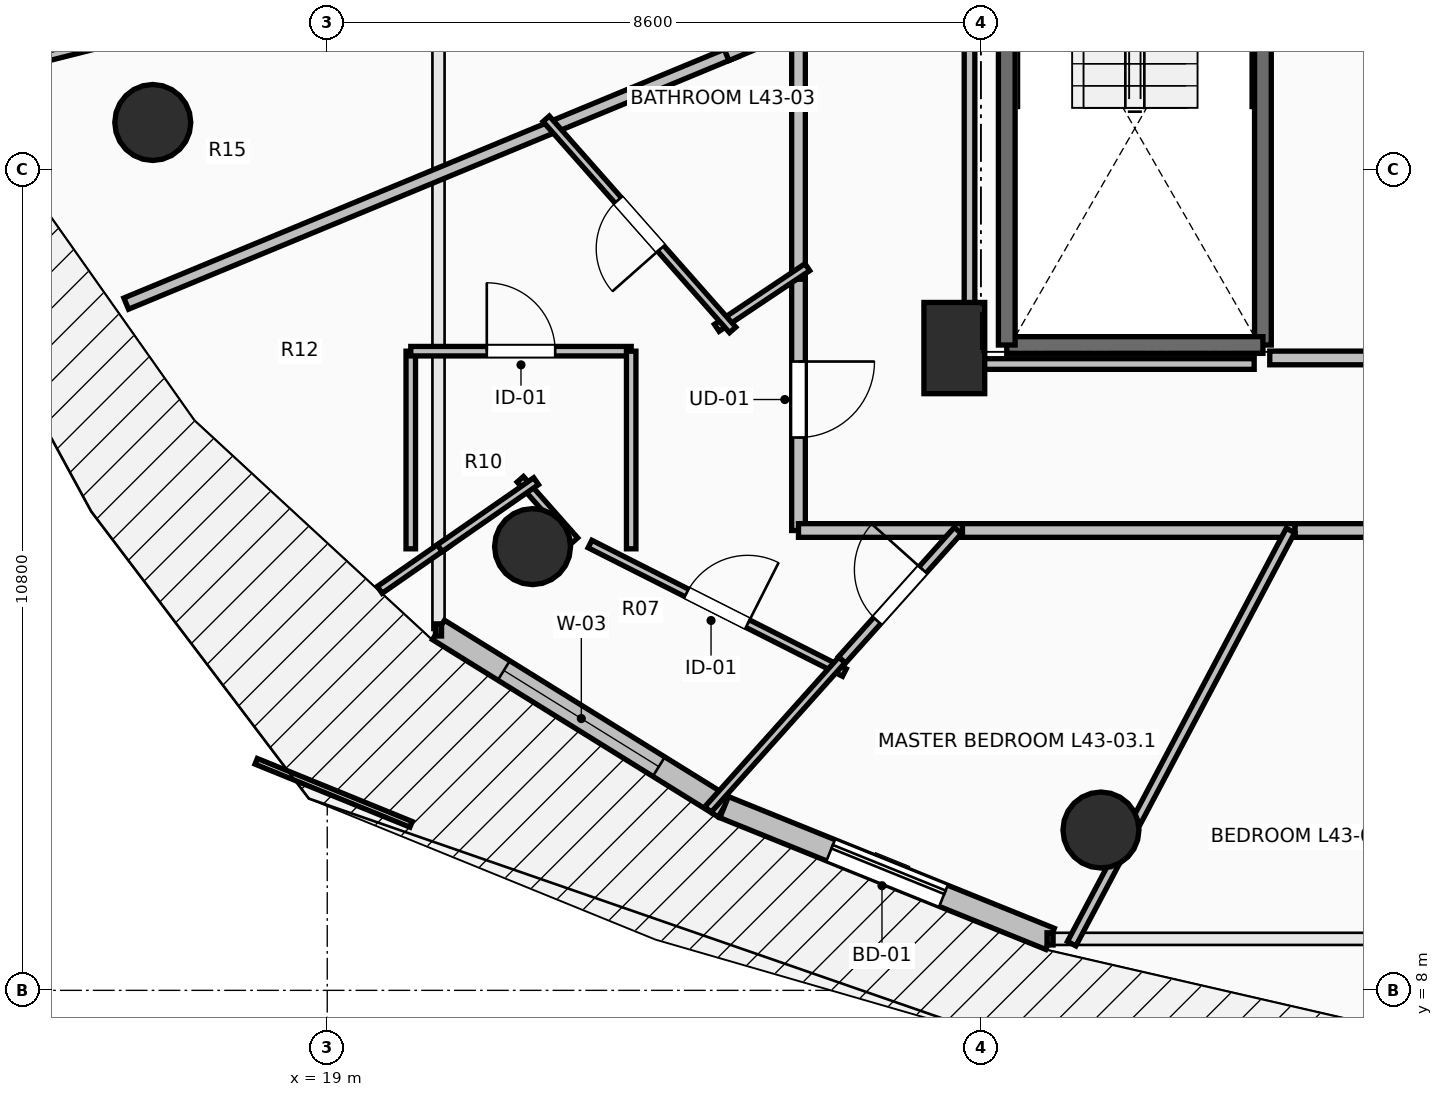
"""IFC4 building model, lengths in metres.
Left out: names, types, materials, properties, quantities, classifications, styles, units other than length and angle.
Written with IfcOpenShell. Run it as: python <this file> out.ifc"""

import sys

from ifc_helpers import new_model, si_unit, direction, frame, frame_2d, origin, origin_2d, place, context, subcontext, project, spatial, rectangle, circle, extrude, element, fill, save


model = new_model("IFC4")
c1 = context("Model", 3, precision=1e-05, world=origin(), true_north=direction((0.0, 1.0)))
c2 = subcontext(c1, "Body", "Model", "MODEL_VIEW")
j1 = project(units=[si_unit("LENGTHUNIT", "METRE"), si_unit("PLANEANGLEUNIT", "RADIAN")], contexts=[c1])
p1 = place(None, origin())
s1 = spatial("IfcSite", under=j1, at=p1, CompositionType="ELEMENT")
p2 = place(p1, origin())
s2 = spatial("IfcBuilding", under=s1, at=p2, CompositionType="ELEMENT")
p3 = place(p2, frame((0.0, 0.0, 160.6)))
s3 = spatial("IfcBuildingStorey", under=s2, at=p3, CompositionType="ELEMENT", Elevation=160.6)
for number, where, z_axis, x_axis in (
    (1, (16.705, 19.418, 0.0), (0.0, 0.0, 1.0), (-0.924, -0.383, 0.0)),
    (2, (21.701, 13.838, 0.0), (0.0, 0.0, 1.0), (-0.707, -0.707, 0.0)),
    (3, (29.179, 10.109, 0.0), (0.0, 0.0, 1.0), (-0.383, -0.924, 0.0)),
):
    element("IfcColumn", number, at=place(p3, frame(where, z_axis=z_axis, x_axis=x_axis)), inside=s3, PredefinedType="COLUMN", context=c2, shape_type="SweptSolid", body=[
        extrude(circle(Radius=0.5, at=origin_2d()), origin(), (0.0, 0.0, 1.0), 3.5),
    ])
p4 = place(p3, frame((27.25, 16.45, 0.0), z_axis=(0.0, 0.0, 1.0), x_axis=(1.0, 0.0, 0.0)))
e4 = element("IfcColumn", 4, at=p4, inside=s3, PredefinedType="PILASTER", context=c2, shape_type="SweptSolid", body=[
    extrude(rectangle(XDim=0.8, YDim=1.2, at=origin_2d()), origin(), (0.0, 0.0, 1.0), 3.5),
])
p5 = place(p3, frame((20.464, 12.742, 0.0), z_axis=(0.0, 0.0, 1.0), x_axis=(0.849721181976, -0.527232313977, 0.0)))
e5 = element("IfcWall", 5, at=p5, inside=s3, PredefinedType="STANDARD", context=c2, shape_type="SweptSolid", body=[
    extrude(rectangle(XDim=4.423, YDim=0.3, at=frame_2d((2.211, 0.0))), origin(), (0.0, 0.0, 1.0), 3.24),
])
p6 = place(p5, frame((1.011, 0.0, 0.85)))
e6 = element("IfcOpeningElement", 6, at=p6, cuts=e5, PredefinedType="OPENING", context=c2, shape_type="SweptSolid", body=[
    extrude(rectangle(XDim=2.4, YDim=2.19, at=frame_2d((1.2, 1.095))), frame((0.0, 0.165, 0.0), z_axis=(0.0, -1.0, 0.0), x_axis=(1.0, 0.0, 0.0)), (0.0, 0.0, 1.0), 0.33),
])
p7 = place(p3, frame((24.222, 10.41, 0.0), z_axis=(0.0, 0.0, 1.0), x_axis=(0.927156504392, -0.374674280359, 0.0)))
e7 = element("IfcWall", 7, at=p7, inside=s3, PredefinedType="STANDARD", context=c2, shape_type="SweptSolid", body=[
    extrude(rectangle(XDim=4.625, YDim=0.3, at=frame_2d((2.312, 0.0))), origin(), (0.0, 0.0, 1.0), 3.24),
])
p8 = place(p7, frame((1.512, 0.0, 0.0)))
e8 = element("IfcOpeningElement", 8, at=p8, cuts=e7, PredefinedType="OPENING", context=c2, shape_type="SweptSolid", body=[
    extrude(rectangle(XDim=1.6, YDim=2.3, at=frame_2d((0.8, 1.15))), frame((0.0, 0.165, 0.0), z_axis=(0.0, -1.0, 0.0), x_axis=(1.0, 0.0, 0.0)), (0.0, 0.0, 1.0), 0.33),
])
p9 = place(p3, frame((31.31, 23.91, 0.0), z_axis=(0.0, 0.0, 1.0), x_axis=(0.0, -1.0, 0.0)))
e9 = element("IfcWall", 9, at=p9, inside=s3, PredefinedType="SOLIDWALL", context=c2, shape_type="SweptSolid", body=[
    extrude(rectangle(XDim=7.42, YDim=0.22, at=frame_2d((3.71, 0.0))), origin(), (0.0, 0.0, 1.0), 3.24),
])
p10 = place(p3, frame((31.31, 16.49, 0.0), z_axis=(0.0, 0.0, 1.0), x_axis=(-1.0, 0.0, 0.0)))
e10 = element("IfcWall", 10, at=p10, inside=s3, PredefinedType="SOLIDWALL", context=c2, shape_type="SweptSolid", body=[
    extrude(rectangle(XDim=3.37, YDim=0.22, at=frame_2d((1.685, 0.0))), origin(), (0.0, 0.0, 1.0), 3.24),
])
p11 = place(p3, frame((27.94, 16.49, 0.0), z_axis=(0.0, 0.0, 1.0), x_axis=(0.0, 1.0, 0.0)))
e11 = element("IfcWall", 11, at=p11, inside=s3, PredefinedType="SOLIDWALL", context=c2, shape_type="SweptSolid", body=[
    extrude(rectangle(XDim=7.42, YDim=0.22, at=frame_2d((3.71, 0.0))), origin(), (0.0, 0.0, 1.0), 3.24),
])
p12 = place(p3, frame((31.4, 16.32, 0.0), z_axis=(0.0, 0.0, 1.0), x_axis=(1.0, 0.0, 0.0)))
e12 = element("IfcWall", 12, at=p12, inside=s3, PredefinedType="PARTITIONING", context=c2, shape_type="SweptSolid", body=[
    extrude(rectangle(XDim=3.55, YDim=0.18, at=frame_2d((1.775, 0.0))), origin(), (0.0, 0.0, 1.0), 3.24),
])
p13 = place(p12, frame((1.35, 0.0, 0.0)))
e13 = element("IfcOpeningElement", 13, at=p13, cuts=e12, PredefinedType="OPENING", context=c2, shape_type="SweptSolid", body=[
    extrude(rectangle(XDim=0.85, YDim=2.1, at=frame_2d((0.425, 1.05))), frame((0.0, 0.105, 0.0), z_axis=(0.0, -1.0, 0.0), x_axis=(1.0, 0.0, 0.0)), (0.0, 0.0, 1.0), 0.21),
])
p14 = place(p3, frame((25.2, 17.496, 0.0), z_axis=(0.0, 0.0, 1.0), x_axis=(0.0, -1.0, 0.0)))
e14 = element("IfcWall", 14, at=p14, inside=s3, PredefinedType="PARTITIONING", context=c2, shape_type="SweptSolid", body=[
    extrude(rectangle(XDim=3.446, YDim=0.18, at=frame_2d((1.723, 0.0))), origin(), (0.0, 0.0, 1.0), 2.432),
])
p15 = place(p14, frame((1.223, 0.0, 0.0)))
e15 = element("IfcOpeningElement", 15, at=p15, cuts=e14, PredefinedType="OPENING", context=c2, shape_type="SweptSolid", body=[
    extrude(rectangle(XDim=1.0, YDim=2.15, at=frame_2d((0.5, 1.075))), frame((0.0, 0.105, 0.0), z_axis=(0.0, -1.0, 0.0), x_axis=(1.0, 0.0, 0.0)), (0.0, 0.0, 1.0), 0.21),
])
p16 = place(p3, frame((25.2, 14.05, 0.0), z_axis=(0.0, 0.0, 1.0), x_axis=(1.0, 0.0, 0.0)))
e16 = element("IfcWall", 16, at=p16, inside=s3, PredefinedType="PARTITIONING", context=c2, shape_type="SweptSolid", body=[
    extrude(rectangle(XDim=2.157, YDim=0.18, at=frame_2d((1.079, 0.0))), origin(), (0.0, 0.0, 1.0), 2.886),
])
p17 = place(p3, frame((25.2, 20.773, 0.0), z_axis=(0.0, 0.0, 1.0), x_axis=(0.0, -1.0, 0.0)))
e17 = element("IfcWall", 17, at=p17, inside=s3, PredefinedType="PARTITIONING", context=c2, shape_type="SweptSolid", body=[
    extrude(rectangle(XDim=3.417, YDim=0.18, at=frame_2d((1.708, 0.0))), origin(), (0.0, 0.0, 1.0), 3.24),
])
p18 = place(p3, frame((27.357, 14.05, 0.0), z_axis=(0.0, 0.0, 1.0), x_axis=(1.0, 0.0, 0.0)))
e18 = element("IfcWall", 18, at=p18, inside=s3, PredefinedType="PARTITIONING", context=c2, shape_type="SweptSolid", body=[
    extrude(rectangle(XDim=4.376, YDim=0.18, at=frame_2d((2.188, 0.0))), origin(), (0.0, 0.0, 1.0), 2.432),
])
p19 = place(p3, frame((31.733, 14.05, 0.0), z_axis=(0.0, 0.0, 1.0), x_axis=(1.0, 0.0, 0.0)))
e19 = element("IfcWall", 19, at=p19, inside=s3, PredefinedType="PARTITIONING", context=c2, shape_type="SweptSolid", body=[
    extrude(rectangle(XDim=3.359, YDim=0.18, at=frame_2d((1.68, 0.0))), origin(), (0.0, 0.0, 1.0), 2.929),
])
p20 = place(p19, frame((1.254, 0.0, 0.0)))
e20 = element("IfcOpeningElement", 20, at=p20, cuts=e19, PredefinedType="OPENING", context=c2, shape_type="SweptSolid", body=[
    extrude(rectangle(XDim=0.85, YDim=2.1, at=frame_2d((0.425, 1.05))), frame((0.0, 0.105, 0.0), z_axis=(0.0, -1.0, 0.0), x_axis=(1.0, 0.0, 0.0)), (0.0, 0.0, 1.0), 0.21),
])
p21 = place(p3, frame((14.576, 20.103, 0.0), z_axis=(0.0, 0.0, 1.0), x_axis=(0.969732134757, 0.244171224389, 0.0)))
e21 = element("IfcWall", 21, at=p21, inside=s3, PredefinedType="PARTITIONING", context=c2, shape_type="SweptSolid", body=[
    extrude(rectangle(XDim=10.956, YDim=0.125, at=frame_2d((5.478, 0.0))), origin(), (0.0, 0.0, 1.0), 2.728),
])
p22 = place(p3, frame((16.355, 17.035, 0.0), z_axis=(0.0, 0.0, 1.0), x_axis=(0.923885339237, 0.382669413387, 0.0)))
e22 = element("IfcWall", 22, at=p22, inside=s3, PredefinedType="PARTITIONING", context=c2, shape_type="SweptSolid", body=[
    extrude(rectangle(XDim=8.689, YDim=0.16, at=frame_2d((4.345, 0.0))), origin(), (0.0, 0.0, 1.0), 2.432),
])
p23 = place(p3, frame((24.254, 20.306, 0.0), z_axis=(0.0, 0.0, 1.0), x_axis=(0.923789545328, 0.382900608439, 0.0)))
e23 = element("IfcWall", 23, at=p23, inside=s3, PredefinedType="PARTITIONING", context=c2, shape_type="SweptSolid", body=[
    extrude(rectangle(XDim=1.021, YDim=0.16, at=frame_2d((0.511, 0.0))), origin(), (0.0, 0.0, 1.0), 3.24),
])
p24 = place(p3, frame((25.316, 17.514, 0.0), z_axis=(0.0, 0.0, 1.0), x_axis=(-0.830948636418, -0.556349138253, 0.0)))
e24 = element("IfcWall", 24, at=p24, inside=s3, PredefinedType="PARTITIONING", context=c2, shape_type="SweptSolid", body=[
    extrude(rectangle(XDim=1.434, YDim=0.11, at=frame_2d((0.717, 0.0))), origin(), (0.0, 0.0, 1.0), 2.432),
])
p25 = place(p3, frame((24.334, 16.689, 0.0), z_axis=(0.0, 0.0, 1.0), x_axis=(-0.662140147261, 0.749380027346, 0.0)))
e25 = element("IfcWall", 25, at=p25, inside=s3, PredefinedType="PARTITIONING", context=c2, shape_type="SweptSolid", body=[
    extrude(rectangle(XDim=3.705, YDim=0.11, at=frame_2d((1.853, 0.0))), origin(), (0.0, 0.0, 1.0), 2.432),
])
p26 = place(p25, frame((1.428, 0.0, 0.0)))
e26 = element("IfcOpeningElement", 26, at=p26, cuts=e25, PredefinedType="OPENING", context=c2, shape_type="SweptSolid", body=[
    extrude(rectangle(XDim=0.85, YDim=2.1, at=frame_2d((0.425, 1.05))), frame((0.0, 0.07, 0.0), z_axis=(0.0, -1.0, 0.0), x_axis=(1.0, 0.0, 0.0)), (0.0, 0.0, 1.0), 0.14),
])
p27 = place(p3, frame((22.457, 13.872, 0.0), z_axis=(0.0, 0.0, 1.0), x_axis=(0.892531160695, -0.450985728364, 0.0)))
e27 = element("IfcWall", 27, at=p27, inside=s3, PredefinedType="PARTITIONING", context=c2, shape_type="SweptSolid", body=[
    extrude(rectangle(XDim=3.75, YDim=0.11, at=frame_2d((1.875, 0.0))), origin(), (0.0, 0.0, 1.0), 3.24),
])
p28 = place(p27, frame((1.425, 0.0, 0.0)))
e28 = element("IfcOpeningElement", 28, at=p28, cuts=e27, PredefinedType="OPENING", context=c2, shape_type="SweptSolid", body=[
    extrude(rectangle(XDim=0.9, YDim=2.1, at=frame_2d((0.45, 1.05))), frame((0.0, 0.07, 0.0), z_axis=(0.0, -1.0, 0.0), x_axis=(1.0, 0.0, 0.0)), (0.0, 0.0, 1.0), 0.14),
])
p29 = place(p3, frame((25.772, 12.348, 0.0), z_axis=(0.0, 0.0, 1.0), x_axis=(-0.667094551448, -0.744973059532, 0.0)))
e29 = element("IfcWall", 29, at=p29, inside=s3, PredefinedType="PARTITIONING", context=c2, shape_type="SweptSolid", body=[
    extrude(rectangle(XDim=2.643, YDim=0.11, at=frame_2d((1.321, 0.0))), origin(), (0.0, 0.0, 1.0), 2.728),
])
p30 = place(p3, frame((19.691, 13.269, 0.0), z_axis=(0.0, 0.0, 1.0), x_axis=(0.821239462259, 0.57058368854, 0.0)))
e30 = element("IfcWall", 30, at=p30, inside=s3, PredefinedType="PARTITIONING", context=c2, shape_type="SweptSolid", body=[
    extrude(rectangle(XDim=1.071, YDim=0.11, at=frame_2d((0.536, 0.0))), origin(), (0.0, 0.0, 1.0), 3.24),
])
p31 = place(p3, frame((20.099, 13.809, 0.0), z_axis=(0.0, 0.0, 1.0), x_axis=(0.0, 1.0, 0.0)))
e31 = element("IfcWall", 31, at=p31, inside=s3, PredefinedType="PARTITIONING", context=c2, shape_type="SweptSolid", body=[
    extrude(rectangle(XDim=2.6, YDim=0.125, at=frame_2d((1.3, 0.0))), origin(), (0.0, 0.0, 1.0), 2.728),
])
p32 = place(p3, frame((20.099, 16.409, 0.0), z_axis=(0.0, 0.0, 1.0), x_axis=(1.0, 0.0, 0.0)))
e32 = element("IfcWall", 32, at=p32, inside=s3, PredefinedType="PARTITIONING", context=c2, shape_type="SweptSolid", body=[
    extrude(rectangle(XDim=2.9, YDim=0.125, at=frame_2d((1.45, 0.0))), origin(), (0.0, 0.0, 1.0), 2.886),
])
p33 = place(p32, frame((1.0, 0.0, 0.0)))
e33 = element("IfcOpeningElement", 33, at=p33, cuts=e32, PredefinedType="OPENING", context=c2, shape_type="SweptSolid", body=[
    extrude(rectangle(XDim=0.9, YDim=2.1, at=frame_2d((0.45, 1.05))), frame((0.0, 0.077, 0.0), z_axis=(0.0, -1.0, 0.0), x_axis=(1.0, 0.0, 0.0)), (0.0, 0.0, 1.0), 0.155),
])
p34 = place(p3, frame((22.999, 16.409, 0.0), z_axis=(0.0, 0.0, 1.0), x_axis=(0.0, -1.0, 0.0)))
e34 = element("IfcWall", 34, at=p34, inside=s3, PredefinedType="PARTITIONING", context=c2, shape_type="SweptSolid", body=[
    extrude(rectangle(XDim=2.6, YDim=0.125, at=frame_2d((1.3, 0.0))), origin(), (0.0, 0.0, 1.0), 2.432),
])
p35 = place(p3, frame((25.773, 12.348, 0.0), z_axis=(0.0, 0.0, 1.0), x_axis=(0.667197684579, 0.744880694939, 0.0)))
e35 = element("IfcWall", 35, at=p35, inside=s3, PredefinedType="PARTITIONING", context=c2, shape_type="SweptSolid", body=[
    extrude(rectangle(XDim=2.285, YDim=0.125, at=frame_2d((1.143, 0.0))), origin(), (0.0, 0.0, 1.0), 2.886),
])
p36 = place(p35, frame((0.692, 0.0, 0.0)))
e36 = element("IfcOpeningElement", 36, at=p36, cuts=e35, PredefinedType="OPENING", context=c2, shape_type="SweptSolid", body=[
    extrude(rectangle(XDim=0.9, YDim=2.1, at=frame_2d((0.45, 1.05))), frame((0.0, 0.077, 0.0), z_axis=(0.0, -1.0, 0.0), x_axis=(1.0, 0.0, 0.0)), (0.0, 0.0, 1.0), 0.155),
])
p37 = place(p3, frame((22.254, 13.917, 0.0), z_axis=(0.0, 0.0, 1.0), x_axis=(-0.662363540736, 0.749182581154, 0.0)))
e37 = element("IfcWall", 37, at=p37, inside=s3, PredefinedType="PARTITIONING", context=c2, shape_type="SweptSolid", body=[
    extrude(rectangle(XDim=1.077, YDim=0.11, at=frame_2d((0.539, 0.0))), origin(), (0.0, 0.0, 1.0), 2.432),
])
p38 = place(p3, frame((21.748, 14.699, 0.0), z_axis=(0.0, 0.0, 1.0), x_axis=(-0.821040550937, -0.570869874592, 0.0)))
e38 = element("IfcWall", 38, at=p38, inside=s3, PredefinedType="PARTITIONING", context=c2, shape_type="SweptSolid", body=[
    extrude(rectangle(XDim=1.544, YDim=0.11, at=frame_2d((0.772, 0.0))), origin(), (0.0, 0.0, 1.0), 2.728),
])
p39 = place(p3, frame((28.794, 8.614, 0.0), z_axis=(0.0, 0.0, 1.0), x_axis=(0.468046359573, 0.883703912682, 0.0)))
e39 = element("IfcWall", 39, at=p39, inside=s3, PredefinedType="PARTITIONING", context=c2, shape_type="SweptSolid", body=[
    extrude(rectangle(XDim=6.151, YDim=0.125, at=frame_2d((3.076, 0.0))), origin(), (0.0, 0.0, 1.0), 2.728),
])
p40 = place(p3, frame((27.45, 23.754, 0.0), z_axis=(0.0, 0.0, 1.0), x_axis=(0.0, -1.0, 0.0)))
e40 = element("IfcWall", 40, at=p40, inside=s3, PredefinedType="PARTITIONING", context=c2, shape_type="SweptSolid", body=[
    extrude(rectangle(XDim=7.514, YDim=0.14, at=frame_2d((3.757, 0.0))), origin(), (0.0, 0.0, 1.0), 2.432),
])
p41 = place(p3, frame((27.45, 16.24, 0.0), z_axis=(0.0, 0.0, 1.0), x_axis=(1.0, 0.0, 0.0)))
e41 = element("IfcWall", 41, at=p41, inside=s3, PredefinedType="PARTITIONING", context=c2, shape_type="SweptSolid", body=[
    extrude(rectangle(XDim=3.745, YDim=0.14, at=frame_2d((1.873, 0.0))), origin(), (0.0, 0.0, 1.0), 2.432),
])
p42 = place(p8, origin())
e42 = element("IfcDoor", 42, at=p42, inside=s3, OperationType="SLIDING_TO_LEFT", PredefinedType="DOOR", context=c2, shape_type="SweptSolid", body=[
    extrude(rectangle(XDim=1.6, YDim=2.3, at=frame_2d((0.8, 1.15))), frame((0.0, 0.025, 0.0), z_axis=(0.0, -1.0, 0.0), x_axis=(1.0, 0.0, 0.0)), (0.0, 0.0, 1.0), 0.05),
])
fill(e8, e42)
p43 = place(p6, origin())
e43 = element("IfcWindow", 43, at=p43, inside=s3, PartitioningType="SINGLE_PANEL", PredefinedType="WINDOW", context=c2, shape_type="SweptSolid", body=[
    extrude(rectangle(XDim=2.4, YDim=2.19, at=frame_2d((1.2, 1.095))), frame((0.0, 0.03, 0.0), z_axis=(0.0, -1.0, 0.0), x_axis=(1.0, 0.0, 0.0)), (0.0, 0.0, 1.0), 0.06),
])
fill(e6, e43)
p44 = place(p15, origin())
e44 = element("IfcDoor", 44, at=p44, inside=s3, OperationType="SINGLE_SWING_LEFT", PredefinedType="DOOR", context=c2, shape_type="SweptSolid", body=[
    extrude(rectangle(XDim=1.0, YDim=2.15, at=frame_2d((0.5, 1.075))), frame((0.0, 0.025, 0.0), z_axis=(0.0, -1.0, 0.0), x_axis=(1.0, 0.0, 0.0)), (0.0, 0.0, 1.0), 0.05),
])
fill(e15, e44)
p45 = place(p26, origin())
e45 = element("IfcDoor", 45, at=p45, inside=s3, OperationType="SINGLE_SWING_LEFT", PredefinedType="DOOR", context=c2, shape_type="SweptSolid", body=[
    extrude(rectangle(XDim=0.85, YDim=2.1, at=frame_2d((0.425, 1.05))), frame((0.0, 0.025, 0.0), z_axis=(0.0, -1.0, 0.0), x_axis=(1.0, 0.0, 0.0)), (0.0, 0.0, 1.0), 0.05),
])
fill(e26, e45)
p46 = place(p28, origin())
e46 = element("IfcDoor", 46, at=p46, inside=s3, OperationType="SINGLE_SWING_RIGHT", PredefinedType="DOOR", context=c2, shape_type="SweptSolid", body=[
    extrude(rectangle(XDim=0.9, YDim=2.1, at=frame_2d((0.45, 1.05))), frame((0.0, 0.025, 0.0), z_axis=(0.0, -1.0, 0.0), x_axis=(1.0, 0.0, 0.0)), (0.0, 0.0, 1.0), 0.05),
])
fill(e28, e46)
p47 = place(p33, origin())
e47 = element("IfcDoor", 47, at=p47, inside=s3, OperationType="SINGLE_SWING_LEFT", PredefinedType="DOOR", context=c2, shape_type="SweptSolid", body=[
    extrude(rectangle(XDim=0.9, YDim=2.1, at=frame_2d((0.45, 1.05))), frame((0.0, 0.025, 0.0), z_axis=(0.0, -1.0, 0.0), x_axis=(1.0, 0.0, 0.0)), (0.0, 0.0, 1.0), 0.05),
])
fill(e33, e47)
p48 = place(p36, origin())
e48 = element("IfcDoor", 48, at=p48, inside=s3, OperationType="SINGLE_SWING_RIGHT", PredefinedType="DOOR", context=c2, shape_type="SweptSolid", body=[
    extrude(rectangle(XDim=0.9, YDim=2.1, at=frame_2d((0.45, 1.05))), frame((0.0, 0.025, 0.0), z_axis=(0.0, -1.0, 0.0), x_axis=(1.0, 0.0, 0.0)), (0.0, 0.0, 1.0), 0.05),
])
fill(e36, e48)
save(model, sys.argv[1])
